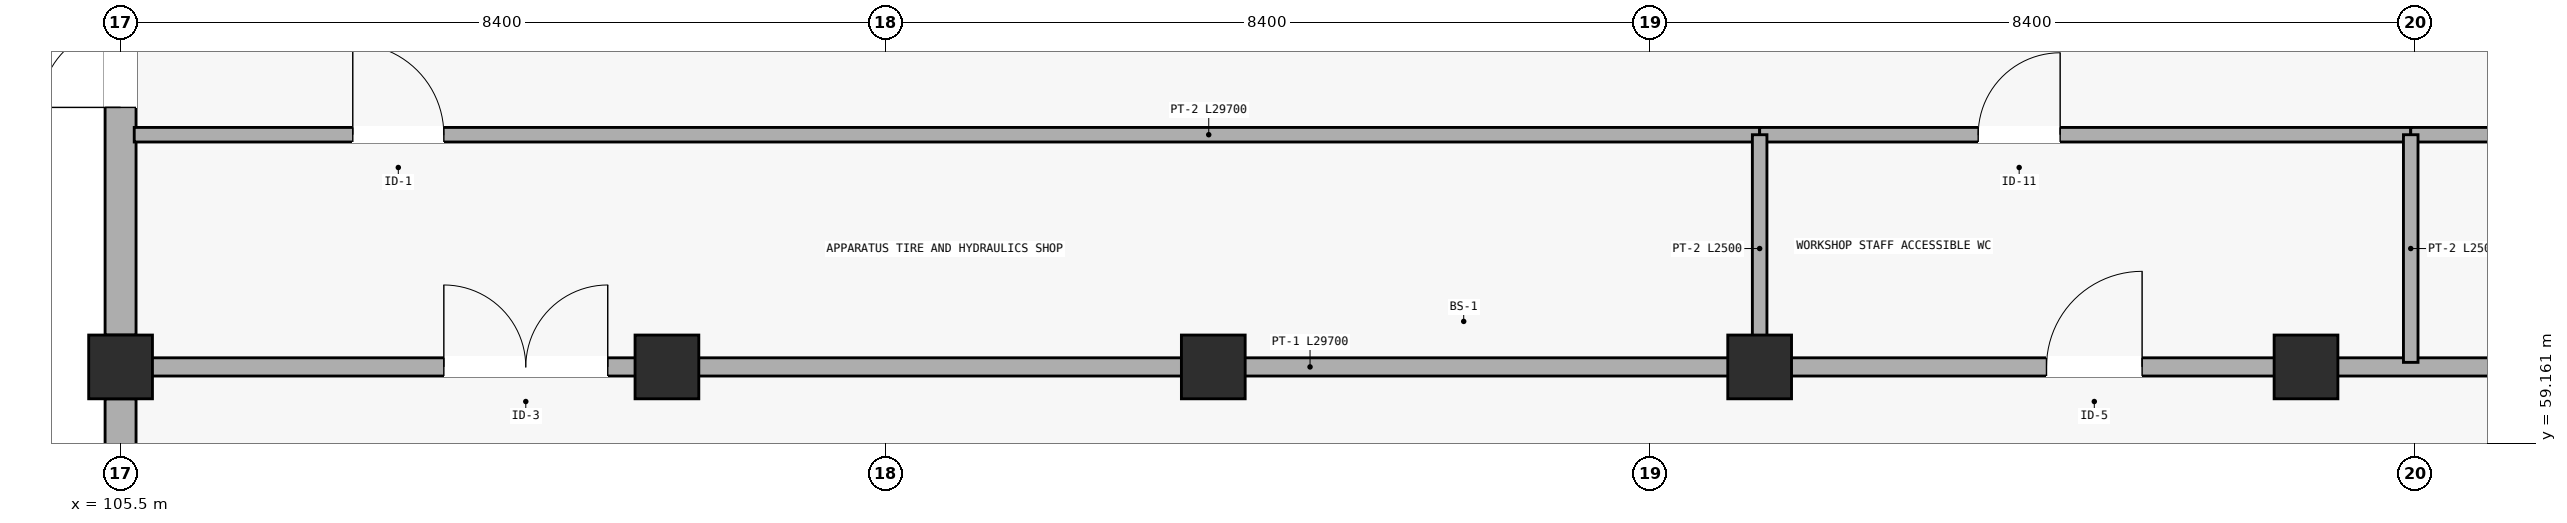
"""IFC4 building model, lengths in metres.
Left out: names, types, materials, properties, quantities, classifications, styles, units other than length and angle.
Written with IfcOpenShell. Run it as: python <this file> out.ifc"""

import sys

from ifc_helpers import new_model, si_unit, direction, frame, frame_2d, origin, origin_2d, place, context, subcontext, project, spatial, rectangle, extrude, element, fill, save


model = new_model("IFC4")
c1 = context("Model", 3, precision=1e-05, world=origin(), true_north=direction((0.0, 1.0)))
c2 = subcontext(c1, "Body", "Model", "MODEL_VIEW")
j1 = project(units=[si_unit("LENGTHUNIT", "METRE"), si_unit("PLANEANGLEUNIT", "RADIAN")], contexts=[c1])
p1 = place(None, origin())
s1 = spatial("IfcSite", under=j1, at=p1, CompositionType="ELEMENT")
p2 = place(p1, origin())
s2 = spatial("IfcBuilding", under=s1, at=p2, CompositionType="ELEMENT")
p3 = place(p2, origin())
s3 = spatial("IfcBuildingStorey", under=s2, at=p3, CompositionType="ELEMENT", Elevation=0.0)
for number, where, z_axis, x_axis in (
    (1, (105.5, 60.0, 0.0), (0.0, 0.0, 1.0), (1.0, 0.0, 0.0)),
    (2, (111.5, 60.0, 0.0), (0.0, 0.0, 1.0), (1.0, 0.0, 0.0)),
    (3, (117.5, 60.0, 0.0), (0.0, 0.0, 1.0), (1.0, 0.0, 0.0)),
    (4, (123.5, 60.0, 0.0), (0.0, 0.0, 1.0), (1.0, 0.0, 0.0)),
    (5, (129.5, 60.0, 0.0), (0.0, 0.0, 1.0), (1.0, 0.0, 0.0)),
):
    element("IfcColumn", number, at=place(p3, frame(where, z_axis=z_axis, x_axis=x_axis)), inside=s3, PredefinedType="COLUMN", context=c2, shape_type="SweptSolid", body=[
        extrude(rectangle(XDim=0.7, YDim=0.7, at=origin_2d()), origin(), (0.0, 0.0, 1.0), 5.85),
    ])
p4 = place(p3, frame((105.5, 48.35, 0.0), z_axis=(0.0, 0.0, 1.0), x_axis=(0.0, 1.0, 0.0)))
e6 = element("IfcWall", 6, at=p4, inside=s3, PredefinedType="STANDARD", context=c2, shape_type="SweptSolid", body=[
    extrude(rectangle(XDim=11.3, YDim=0.34, at=frame_2d((5.65, 0.0))), origin(), (0.0, 0.0, 1.0), 4.749),
])
p5 = place(p4, frame((3.5, 0.0, 0.95)))
e7 = element("IfcOpeningElement", 7, at=p5, cuts=e6, PredefinedType="OPENING", context=c2, shape_type="SweptSolid", body=[
    extrude(rectangle(XDim=2.05, YDim=1.4, at=frame_2d((1.025, 0.7))), frame((0.0, 0.18, 0.0), z_axis=(0.0, -1.0, 0.0), x_axis=(1.0, 0.0, 0.0)), (0.0, 0.0, 1.0), 0.36),
])
p6 = place(p3, frame((105.5, 60.35, 0.0), z_axis=(0.0, 0.0, 1.0), x_axis=(0.0, 1.0, 0.0)))
e8 = element("IfcWall", 8, at=p6, inside=s3, PredefinedType="STANDARD", context=c2, shape_type="SweptSolid", body=[
    extrude(rectangle(XDim=12.3, YDim=0.34, at=frame_2d((6.15, 0.0))), origin(), (0.0, 0.0, 1.0), 4.749),
])
p7 = place(p6, frame((2.5, 0.0, 0.0)))
e9 = element("IfcOpeningElement", 9, at=p7, cuts=e8, PredefinedType="OPENING", context=c2, shape_type="SweptSolid", body=[
    extrude(rectangle(XDim=1.75, YDim=2.2, at=frame_2d((0.875, 1.1))), frame((0.0, 0.18, 0.0), z_axis=(0.0, -1.0, 0.0), x_axis=(1.0, 0.0, 0.0)), (0.0, 0.0, 1.0), 0.36),
])
p8 = place(p3, frame((105.65, 60.0, 0.0), z_axis=(0.0, 0.0, 1.0), x_axis=(1.0, 0.0, 0.0)))
e10 = element("IfcWall", 10, at=p8, inside=s3, PredefinedType="PARTITIONING", context=c2, shape_type="SweptSolid", body=[
    extrude(rectangle(XDim=29.7, YDim=0.2, at=frame_2d((14.85, 0.0))), origin(), (0.0, 0.0, 1.0), 4.678),
])
p9 = place(p8, frame((3.4, 0.0, 0.0)))
e11 = element("IfcOpeningElement", 11, at=p9, cuts=e10, PredefinedType="OPENING", context=c2, shape_type="SweptSolid", body=[
    extrude(rectangle(XDim=1.8, YDim=2.18, at=frame_2d((0.9, 1.09))), frame((0.0, 0.11, 0.0), z_axis=(0.0, -1.0, 0.0), x_axis=(1.0, 0.0, 0.0)), (0.0, 0.0, 1.0), 0.22),
])
p10 = place(p8, frame((21.0, 0.0, 0.0)))
e12 = element("IfcOpeningElement", 12, at=p10, cuts=e10, PredefinedType="OPENING", context=c2, shape_type="SweptSolid", body=[
    extrude(rectangle(XDim=1.05, YDim=2.14, at=frame_2d((0.525, 1.07))), frame((0.0, 0.11, 0.0), z_axis=(0.0, -1.0, 0.0), x_axis=(1.0, 0.0, 0.0)), (0.0, 0.0, 1.0), 0.22),
])
p11 = place(p3, frame((105.65, 62.55, 0.0), z_axis=(0.0, 0.0, 1.0), x_axis=(1.0, 0.0, 0.0)))
e13 = element("IfcWall", 13, at=p11, inside=s3, PredefinedType="PARTITIONING", context=c2, shape_type="SweptSolid", body=[
    extrude(rectangle(XDim=17.85, YDim=0.16, at=frame_2d((8.925, 0.0))), origin(), (0.0, 0.0, 1.0), 5.0),
])
p12 = place(p11, frame((2.4, 0.0, 0.0)))
e14 = element("IfcOpeningElement", 14, at=p12, cuts=e13, PredefinedType="OPENING", context=c2, shape_type="SweptSolid", body=[
    extrude(rectangle(XDim=1.0, YDim=2.12, at=frame_2d((0.5, 1.06))), frame((0.0, 0.09, 0.0), z_axis=(0.0, -1.0, 0.0), x_axis=(1.0, 0.0, 0.0)), (0.0, 0.0, 1.0), 0.18),
])
p13 = place(p3, frame((123.5, 62.55, 0.0), z_axis=(0.0, 0.0, 1.0), x_axis=(1.0, 0.0, 0.0)))
e15 = element("IfcWall", 15, at=p13, inside=s3, PredefinedType="PARTITIONING", context=c2, shape_type="SweptSolid", body=[
    extrude(rectangle(XDim=7.15, YDim=0.16, at=frame_2d((3.575, 0.0))), origin(), (0.0, 0.0, 1.0), 5.0),
])
p14 = place(p13, frame((2.4, 0.0, 0.0)))
e16 = element("IfcOpeningElement", 16, at=p14, cuts=e15, PredefinedType="OPENING", context=c2, shape_type="SweptSolid", body=[
    extrude(rectangle(XDim=0.9, YDim=2.08, at=frame_2d((0.45, 1.04))), frame((0.0, 0.09, 0.0), z_axis=(0.0, -1.0, 0.0), x_axis=(1.0, 0.0, 0.0)), (0.0, 0.0, 1.0), 0.18),
])
p15 = place(p3, frame((130.65, 62.55, 0.0), z_axis=(0.0, 0.0, 1.0), x_axis=(1.0, 0.0, 0.0)))
e17 = element("IfcWall", 17, at=p15, inside=s3, PredefinedType="PARTITIONING", context=c2, shape_type="SweptSolid", body=[
    extrude(rectangle(XDim=4.7, YDim=0.16, at=frame_2d((2.35, 0.0))), origin(), (0.0, 0.0, 1.0), 5.0),
])
p16 = place(p3, frame((123.5, 60.05, 0.0), z_axis=(0.0, 0.0, 1.0), x_axis=(0.0, 1.0, 0.0)))
e18 = element("IfcWall", 18, at=p16, inside=s3, PredefinedType="PARTITIONING", context=c2, shape_type="SweptSolid", body=[
    extrude(rectangle(XDim=2.5, YDim=0.16, at=frame_2d((1.25, 0.0))), origin(), (0.0, 0.0, 1.0), 4.749),
])
p17 = place(p3, frame((130.65, 60.05, 0.0), z_axis=(0.0, 0.0, 1.0), x_axis=(0.0, 1.0, 0.0)))
e19 = element("IfcWall", 19, at=p17, inside=s3, PredefinedType="PARTITIONING", context=c2, shape_type="SweptSolid", body=[
    extrude(rectangle(XDim=2.5, YDim=0.16, at=frame_2d((1.25, 0.0))), origin(), (0.0, 0.0, 1.0), 5.0),
])
p18 = place(p7, origin())
e20 = element("IfcDoor", 20, at=p18, inside=s3, OperationType="DOUBLE_DOOR_SINGLE_SWING", PredefinedType="DOOR", context=c2, shape_type="SweptSolid", body=[
    extrude(rectangle(XDim=1.75, YDim=2.2, at=frame_2d((0.875, 1.1))), frame((0.0, 0.025, 0.0), z_axis=(0.0, -1.0, 0.0), x_axis=(1.0, 0.0, 0.0)), (0.0, 0.0, 1.0), 0.05),
])
fill(e9, e20)
p19 = place(p9, origin())
e21 = element("IfcDoor", 21, at=p19, inside=s3, OperationType="DOUBLE_DOOR_SINGLE_SWING", PredefinedType="DOOR", context=c2, shape_type="SweptSolid", body=[
    extrude(rectangle(XDim=1.8, YDim=2.18, at=frame_2d((0.9, 1.09))), frame((0.0, 0.025, 0.0), z_axis=(0.0, -1.0, 0.0), x_axis=(1.0, 0.0, 0.0)), (0.0, 0.0, 1.0), 0.05),
])
fill(e11, e21)
p20 = place(p10, origin())
e22 = element("IfcDoor", 22, at=p20, inside=s3, OperationType="SINGLE_SWING_RIGHT", PredefinedType="DOOR", context=c2, shape_type="SweptSolid", body=[
    extrude(rectangle(XDim=1.05, YDim=2.14, at=frame_2d((0.525, 1.07))), frame((0.0, 0.025, 0.0), z_axis=(0.0, -1.0, 0.0), x_axis=(1.0, 0.0, 0.0)), (0.0, 0.0, 1.0), 0.05),
])
fill(e12, e22)
p21 = place(p12, origin())
e23 = element("IfcDoor", 23, at=p21, inside=s3, OperationType="SINGLE_SWING_LEFT", PredefinedType="DOOR", context=c2, shape_type="SweptSolid", body=[
    extrude(rectangle(XDim=1.0, YDim=2.12, at=frame_2d((0.5, 1.06))), frame((0.0, 0.025, 0.0), z_axis=(0.0, -1.0, 0.0), x_axis=(1.0, 0.0, 0.0)), (0.0, 0.0, 1.0), 0.05),
])
fill(e14, e23)
p22 = place(p14, origin())
e24 = element("IfcDoor", 24, at=p22, inside=s3, OperationType="SINGLE_SWING_RIGHT", PredefinedType="DOOR", context=c2, shape_type="SweptSolid", body=[
    extrude(rectangle(XDim=0.9, YDim=2.08, at=frame_2d((0.45, 1.04))), frame((0.0, 0.025, 0.0), z_axis=(0.0, -1.0, 0.0), x_axis=(1.0, 0.0, 0.0)), (0.0, 0.0, 1.0), 0.05),
])
fill(e16, e24)
save(model, sys.argv[1])
